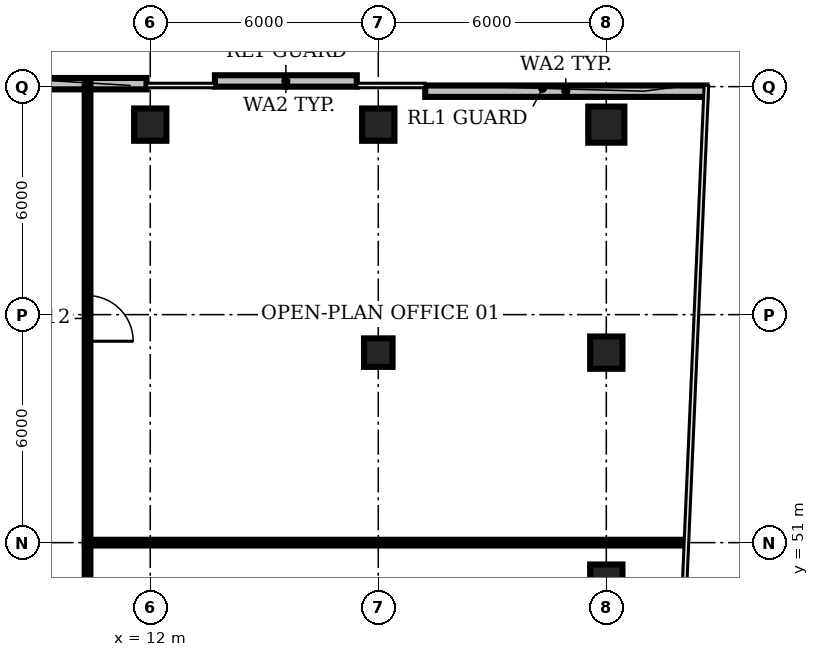
"""IFC4 building model, lengths in metres.
Left out: names, types, materials, properties, quantities, classifications, styles, units other than length and angle.
Written with IfcOpenShell. Run it as: python <this file> out.ifc"""

import sys

from ifc_helpers import new_model, si_unit, direction, frame, frame_2d, origin, origin_2d, place, context, subcontext, project, spatial, rectangle, circle, extrude, element, fill, save


model = new_model("IFC4")
c1 = context("Model", 3, precision=1e-05, world=origin(), true_north=direction((0.0, 1.0)))
c2 = subcontext(c1, "Body", "Model", "MODEL_VIEW")
j1 = project(units=[si_unit("LENGTHUNIT", "METRE"), si_unit("PLANEANGLEUNIT", "RADIAN")], contexts=[c1])
p1 = place(None, origin())
s1 = spatial("IfcSite", under=j1, at=p1, CompositionType="ELEMENT")
p2 = place(p1, origin())
s2 = spatial("IfcBuilding", under=s1, at=p2, CompositionType="ELEMENT")
p3 = place(p2, frame((0.0, 0.0, 159.2)))
s3 = spatial("IfcBuildingStorey", under=s2, at=p3, CompositionType="ELEMENT", Elevation=159.2)
p4 = place(p3, frame((12.0, 62.0, 0.0), z_axis=(0.0, 0.0, 1.0), x_axis=(1.0, 0.0, 0.0)))
e1 = element("IfcColumn", 1, at=p4, inside=s3, PredefinedType="COLUMN", context=c2, shape_type="SweptSolid", body=[
    extrude(rectangle(XDim=0.85, YDim=0.85, at=origin_2d()), origin(), (0.0, 0.0, 1.0), 3.85),
])
p5 = place(p3, frame((18.0, 56.0, 0.0), z_axis=(0.0, 0.0, 1.0), x_axis=(1.0, 0.0, 0.0)))
e2 = element("IfcColumn", 2, at=p5, inside=s3, PredefinedType="COLUMN", context=c2, shape_type="SweptSolid", body=[
    extrude(rectangle(XDim=0.75, YDim=0.75, at=origin_2d()), origin(), (0.0, 0.0, 1.0), 3.85),
])
for number, where, z_axis, x_axis in (
    (3, (18.0, 62.0, 0.0), (0.0, 0.0, 1.0), (1.0, 0.0, 0.0)),
    (4, (24.0, 50.0, 0.0), (0.0, 0.0, 1.0), (1.0, 0.0, 0.0)),
    (5, (24.0, 56.0, 0.0), (0.0, 0.0, 1.0), (1.0, 0.0, 0.0)),
):
    element("IfcColumn", number, at=place(p3, frame(where, z_axis=z_axis, x_axis=x_axis)), inside=s3, PredefinedType="COLUMN", context=c2, shape_type="SweptSolid", body=[
        extrude(rectangle(XDim=0.85, YDim=0.85, at=origin_2d()), origin(), (0.0, 0.0, 1.0), 3.85),
    ])
p6 = place(p3, frame((24.0, 62.0, 0.0), z_axis=(0.0, 0.0, 1.0), x_axis=(1.0, 0.0, 0.0)))
e6 = element("IfcColumn", 6, at=p6, inside=s3, PredefinedType="COLUMN", context=c2, shape_type="SweptSolid", body=[
    extrude(circle(Radius=0.475, at=origin_2d()), origin(), (0.0, 0.0, 1.0), 3.85),
])
p7 = place(p3, frame((26.634, 62.88, 0.0), z_axis=(0.0, 0.0, 1.0), x_axis=(-1.0, 0.0, 0.0)))
e7 = element("IfcWall", 7, at=p7, inside=s3, PredefinedType="SOLIDWALL", context=c2, shape_type="SweptSolid", body=[
    extrude(rectangle(XDim=7.399, YDim=0.3, at=frame_2d((3.699, 0.0))), origin(), (0.0, 0.0, 1.0), 3.85),
])
p8 = place(p3, frame((17.435, 63.149, 0.0), z_axis=(0.0, 0.0, 1.0), x_axis=(-1.0, 0.0, 0.0)))
e8 = element("IfcWall", 8, at=p8, inside=s3, PredefinedType="SOLIDWALL", context=c2, shape_type="SweptSolid", body=[
    extrude(rectangle(XDim=3.733, YDim=0.3, at=frame_2d((1.866, 0.0))), origin(), (0.0, 0.0, 1.0), 3.85),
])
p9 = place(p3, frame((11.902, 63.078, 0.0), z_axis=(0.0, 0.0, 1.0), x_axis=(-1.0, 0.0, 0.0)))
e9 = element("IfcWall", 9, at=p9, inside=s3, PredefinedType="SOLIDWALL", context=c2, shape_type="SweptSolid", body=[
    extrude(rectangle(XDim=12.932, YDim=0.3, at=frame_2d((6.466, 0.0))), origin(), (0.0, 0.0, 1.0), 3.85),
])
p10 = place(p3, frame((10.35, 51.0, 0.0), z_axis=(0.0, 0.0, 1.0), x_axis=(0.0, -1.0, 0.0)))
e10 = element("IfcWall", 10, at=p10, inside=s3, PredefinedType="PARTITIONING", context=c2, shape_type="SweptSolid", body=[
    extrude(rectangle(XDim=6.0, YDim=0.15, at=frame_2d((3.0, 0.0))), origin(), (0.0, 0.0, 1.0), 2.88),
])
p11 = place(p10, frame((2.4, 0.0, 0.0)))
e11 = element("IfcOpeningElement", 11, at=p11, cuts=e10, PredefinedType="OPENING", context=c2, shape_type="SweptSolid", body=[
    extrude(rectangle(XDim=1.0, YDim=2.1, at=frame_2d((0.5, 1.05))), frame((0.0, 0.085, 0.0), z_axis=(0.0, -1.0, 0.0), x_axis=(1.0, 0.0, 0.0)), (0.0, 0.0, 1.0), 0.17),
])
p12 = place(p3, frame((10.35, 51.0, 0.0), z_axis=(0.0, 0.0, 1.0), x_axis=(1.0, 0.0, 0.0)))
e12 = element("IfcWall", 12, at=p12, inside=s3, PredefinedType="PARTITIONING", context=c2, shape_type="SweptSolid", body=[
    extrude(rectangle(XDim=15.71, YDim=0.15, at=frame_2d((7.855, 0.0))), origin(), (0.0, 0.0, 1.0), 2.88),
])
p13 = place(p3, frame((10.35, 63.09, 0.0), z_axis=(0.0, 0.0, 1.0), x_axis=(0.0, -1.0, 0.0)))
e13 = element("IfcWall", 13, at=p13, inside=s3, PredefinedType="PARTITIONING", context=c2, shape_type="SweptSolid", body=[
    extrude(rectangle(XDim=12.09, YDim=0.15, at=frame_2d((6.045, 0.0))), origin(), (0.0, 0.0, 1.0), 2.88),
])
p14 = place(p13, frame((5.59, 0.0, 0.0)))
e14 = element("IfcOpeningElement", 14, at=p14, cuts=e13, PredefinedType="OPENING", context=c2, shape_type="SweptSolid", body=[
    extrude(rectangle(XDim=1.2, YDim=2.1, at=frame_2d((0.6, 1.05))), frame((0.0, 0.085, 0.0), z_axis=(0.0, -1.0, 0.0), x_axis=(1.0, 0.0, 0.0)), (0.0, 0.0, 1.0), 0.17),
])
p15 = place(p14, origin())
e15 = element("IfcDoor", 15, at=p15, inside=s3, OperationType="SINGLE_SWING_RIGHT", PredefinedType="DOOR", context=c2, shape_type="SweptSolid", body=[
    extrude(rectangle(XDim=1.2, YDim=2.1, at=frame_2d((0.6, 1.05))), frame((0.0, 0.025, 0.0), z_axis=(0.0, -1.0, 0.0), x_axis=(1.0, 0.0, 0.0)), (0.0, 0.0, 1.0), 0.05),
])
fill(e14, e15)
save(model, sys.argv[1])
